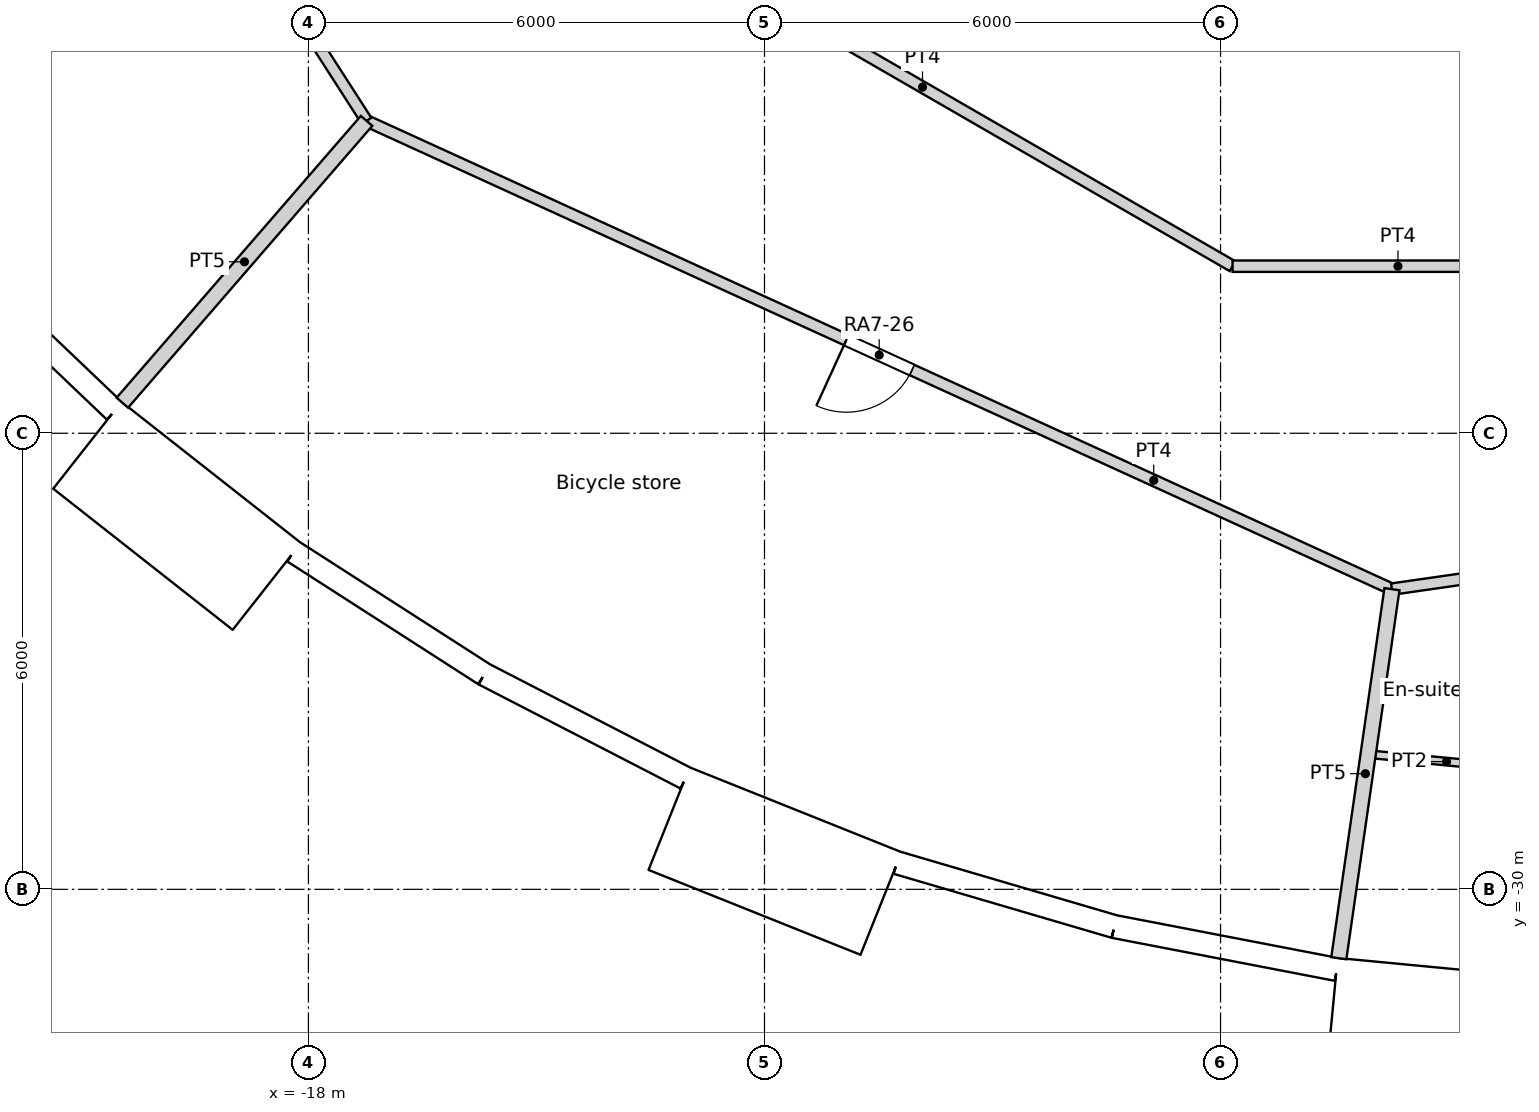
"""IFC4 building model, lengths in metres.
Left out: names, types, materials, properties, quantities, classifications, styles, units other than length and angle.
Written with IfcOpenShell. Run it as: python <this file> out.ifc"""

import sys

from ifc_helpers import new_model, si_unit, direction, frame, frame_2d, origin, origin_2d, place, context, subcontext, project, spatial, rectangle, circle, extrude, element, fill, save


model = new_model("IFC4")
c1 = context("Model", 3, precision=1e-05, world=origin(), true_north=direction((0.0, 1.0)))
c2 = subcontext(c1, "Body", "Model", "MODEL_VIEW")
j1 = project(units=[si_unit("LENGTHUNIT", "METRE"), si_unit("PLANEANGLEUNIT", "RADIAN")], contexts=[c1])
p1 = place(None, origin())
s1 = spatial("IfcSite", under=j1, at=p1, CompositionType="ELEMENT")
p2 = place(p1, origin())
s2 = spatial("IfcBuilding", under=s1, at=p2, CompositionType="ELEMENT")
p3 = place(p2, frame((0.0, 0.0, 93.0)))
s3 = spatial("IfcBuildingStorey", under=s2, at=p3, CompositionType="ELEMENT", Elevation=93.0)
for number, where, z_axis, x_axis in (
    (1, (-19.826, -22.88, 0.0), (0.0, 0.0, 1.0), (1.0, 0.0, 0.0)),
    (2, (-15.137, -26.219, 0.0), (0.0, 0.0, 1.0), (1.0, 0.0, 0.0)),
    (3, (-9.902, -28.61, 0.0), (0.0, 0.0, 1.0), (1.0, 0.0, 0.0)),
    (4, (-4.309, -29.966, 0.0), (0.0, 0.0, 1.0), (1.0, 0.0, 0.0)),
):
    element("IfcColumn", number, at=place(p3, frame(where, z_axis=z_axis, x_axis=x_axis)), inside=s3, PredefinedType="COLUMN", context=c2, shape_type="SweptSolid", body=[
        extrude(circle(Radius=0.6, at=origin_2d()), origin(), (0.0, 0.0, 1.0), 3.6),
    ])
for number, where, z_axis, x_axis in (
    (5, (-12.274, -21.259, 0.0), (0.0, 0.0, 1.0), (1.0, 0.0, 0.0)),
    (6, (-7.04, -23.516, 0.0), (0.0, 0.0, 1.0), (1.0, 0.0, 0.0)),
):
    element("IfcColumn", number, at=place(p3, frame(where, z_axis=z_axis, x_axis=x_axis)), inside=s3, PredefinedType="COLUMN", context=c2, shape_type="SweptSolid", body=[
        extrude(circle(Radius=0.65, at=origin_2d()), origin(), (0.0, 0.0, 1.0), 3.6),
    ])
p4 = place(p3, frame((-4.188, -18.35, 0.0), z_axis=(0.0, 0.0, 1.0), x_axis=(1.0, 0.0, 0.0)))
e7 = element("IfcColumn", 7, at=p4, inside=s3, PredefinedType="COLUMN", context=c2, shape_type="SweptSolid", body=[
    extrude(circle(Radius=0.7, at=origin_2d()), origin(), (0.0, 0.0, 1.0), 3.6),
])
p5 = place(p3, frame((-22.707, -21.651, 0.0), z_axis=(0.0, 0.0, 1.0), x_axis=(0.723744206617, -0.690068346896, 0.0)))
e8 = element("IfcWall", 8, at=p5, inside=s3, PredefinedType="SOLIDWALL", context=c2, shape_type="SweptSolid", body=[
    extrude(rectangle(XDim=2.98, YDim=0.3, at=frame_2d((1.49, 0.0))), origin(), (0.0, 0.0, 1.0), 3.15),
])
p6 = place(p5, frame((1.49, 0.0, 1.55)))
e9 = element("IfcOpeningElement", 9, at=p6, cuts=e8, PredefinedType="OPENING", context=c2, shape_type="SweptSolid", body=[
    extrude(circle(Radius=0.9, at=origin_2d()), frame((0.0, 0.16, 0.0), z_axis=(0.0, -1.0, 0.0), x_axis=(1.0, 0.0, 0.0)), (0.0, 0.0, 1.0), 0.32),
])
p7 = place(p3, frame((-20.907, -24.159, -0.45), z_axis=(0.0, 0.0, 1.0), x_axis=(0.786049992888, -0.618162930529, 0.0)))
e10 = element("IfcWall", 10, at=p7, inside=s3, PredefinedType="ELEMENTEDWALL", context=c2, shape_type="SweptSolid", body=[
    extrude(rectangle(XDim=3.0, YDim=1.45, at=frame_2d((1.5, 0.0))), origin(), (0.0, 0.0, 1.0), 3.6),
])
p8 = place(p7, frame((1.5, 0.0, 2.0)))
e11 = element("IfcOpeningElement", 11, at=p8, cuts=e10, PredefinedType="OPENING", context=c2, shape_type="SweptSolid", body=[
    extrude(circle(Radius=0.9, at=origin_2d()), frame((0.0, 0.735, 0.0), z_axis=(0.0, -1.0, 0.0), x_axis=(1.0, 0.0, 0.0)), (0.0, 0.0, 1.0), 1.47),
])
p9 = place(p3, frame((-18.194, -25.56, 0.0), z_axis=(0.0, 0.0, 1.0), x_axis=(0.84122372879, -0.540687190639, 0.0)))
e12 = element("IfcWall", 12, at=p9, inside=s3, PredefinedType="SOLIDWALL", context=c2, shape_type="SweptSolid", body=[
    extrude(rectangle(XDim=2.98, YDim=0.3, at=frame_2d((1.49, 0.0))), origin(), (0.0, 0.0, 1.0), 3.15),
])
p10 = place(p9, frame((1.49, 0.0, 1.55)))
e13 = element("IfcOpeningElement", 13, at=p10, cuts=e12, PredefinedType="OPENING", context=c2, shape_type="SweptSolid", body=[
    extrude(circle(Radius=0.9, at=origin_2d()), frame((0.0, 0.16, 0.0), z_axis=(0.0, -1.0, 0.0), x_axis=(1.0, 0.0, 0.0)), (0.0, 0.0, 1.0), 0.32),
])
p11 = place(p3, frame((-15.687, -27.171, 0.0), z_axis=(0.0, 0.0, 1.0), x_axis=(0.888853225096, -0.4581920386, 0.0)))
e14 = element("IfcWall", 14, at=p11, inside=s3, PredefinedType="SOLIDWALL", context=c2, shape_type="SweptSolid", body=[
    extrude(rectangle(XDim=2.979, YDim=0.3, at=frame_2d((1.49, 0.0))), origin(), (0.0, 0.0, 1.0), 3.15),
])
p12 = place(p11, frame((1.49, 0.0, 1.55)))
e15 = element("IfcOpeningElement", 15, at=p12, cuts=e14, PredefinedType="OPENING", context=c2, shape_type="SweptSolid", body=[
    extrude(circle(Radius=0.9, at=origin_2d()), frame((0.0, 0.16, 0.0), z_axis=(0.0, -1.0, 0.0), x_axis=(1.0, 0.0, 0.0)), (0.0, 0.0, 1.0), 0.32),
])
p13 = place(p3, frame((-13.254, -29.07, -0.45), z_axis=(0.0, 0.0, 1.0), x_axis=(0.928358776184, -0.371685327504, 0.0)))
e16 = element("IfcWall", 16, at=p13, inside=s3, PredefinedType="ELEMENTEDWALL", context=c2, shape_type="SweptSolid", body=[
    extrude(rectangle(XDim=3.0, YDim=1.45, at=frame_2d((1.5, 0.0))), origin(), (0.0, 0.0, 1.0), 3.6),
])
p14 = place(p13, frame((1.5, 0.0, 2.0)))
e17 = element("IfcOpeningElement", 17, at=p14, cuts=e16, PredefinedType="OPENING", context=c2, shape_type="SweptSolid", body=[
    extrude(circle(Radius=0.9, at=origin_2d()), frame((0.0, 0.735, 0.0), z_axis=(0.0, -1.0, 0.0), x_axis=(1.0, 0.0, 0.0)), (0.0, 0.0, 1.0), 1.47),
])
p15 = place(p3, frame((-10.256, -29.651, 0.0), z_axis=(0.0, 0.0, 1.0), x_axis=(0.959507586834, -0.28168278401, 0.0)))
e18 = element("IfcWall", 18, at=p15, inside=s3, PredefinedType="SOLIDWALL", context=c2, shape_type="SweptSolid", body=[
    extrude(rectangle(XDim=2.98, YDim=0.3, at=frame_2d((1.49, 0.0))), origin(), (0.0, 0.0, 1.0), 3.15),
])
p16 = place(p15, frame((1.49, 0.0, 1.55)))
e19 = element("IfcOpeningElement", 19, at=p16, cuts=e18, PredefinedType="OPENING", context=c2, shape_type="SweptSolid", body=[
    extrude(circle(Radius=0.9, at=origin_2d()), frame((0.0, 0.16, 0.0), z_axis=(0.0, -1.0, 0.0), x_axis=(1.0, 0.0, 0.0)), (0.0, 0.0, 1.0), 0.32),
])
p17 = place(p3, frame((-7.397, -30.49, 0.0), z_axis=(0.0, 0.0, 1.0), x_axis=(0.981924535406, -0.189272836848, 0.0)))
e20 = element("IfcWall", 20, at=p17, inside=s3, PredefinedType="SOLIDWALL", context=c2, shape_type="SweptSolid", body=[
    extrude(rectangle(XDim=2.98, YDim=0.3, at=frame_2d((1.49, 0.0))), origin(), (0.0, 0.0, 1.0), 3.15),
])
p18 = place(p17, frame((1.49, 0.0, 1.55)))
e21 = element("IfcOpeningElement", 21, at=p18, cuts=e20, PredefinedType="OPENING", context=c2, shape_type="SweptSolid", body=[
    extrude(circle(Radius=0.9, at=origin_2d()), frame((0.0, 0.16, 0.0), z_axis=(0.0, -1.0, 0.0), x_axis=(1.0, 0.0, 0.0)), (0.0, 0.0, 1.0), 0.32),
])
p19 = place(p3, frame((-4.527, -31.627, -0.45), z_axis=(0.0, 0.0, 1.0), x_axis=(0.995472768558, -0.09504718333, 0.0)))
e22 = element("IfcWall", 22, at=p19, inside=s3, PredefinedType="ELEMENTEDWALL", context=c2, shape_type="SweptSolid", body=[
    extrude(rectangle(XDim=3.0, YDim=1.45, at=frame_2d((1.5, 0.0))), origin(), (0.0, 0.0, 1.0), 3.6),
])
p20 = place(p19, frame((1.5, 0.0, 2.0)))
e23 = element("IfcOpeningElement", 23, at=p20, cuts=e22, PredefinedType="OPENING", context=c2, shape_type="SweptSolid", body=[
    extrude(circle(Radius=0.9, at=origin_2d()), frame((0.0, 0.735, 0.0), z_axis=(0.0, -1.0, 0.0), x_axis=(1.0, 0.0, 0.0)), (0.0, 0.0, 1.0), 1.47),
])
p21 = place(p3, frame((-25.253, -7.415, 0.0), z_axis=(0.0, 0.0, 1.0), x_axis=(0.540656073354, -0.841243728265, 0.0)))
e24 = element("IfcWall", 24, at=p21, inside=s3, PredefinedType="PARTITIONING", context=c2, shape_type="SweptSolid", body=[
    extrude(rectangle(XDim=14.829, YDim=0.15, at=frame_2d((7.415, 0.0))), origin(), (0.0, 0.0, 1.0), 3.15),
])
p22 = place(p21, frame((4.804, 0.0, 0.0)))
e25 = element("IfcOpeningElement", 25, at=p22, cuts=e24, PredefinedType="OPENING", context=c2, shape_type="SweptSolid", body=[
    extrude(rectangle(XDim=1.8, YDim=2.1, at=frame_2d((0.9, 1.05))), frame((0.0, 0.075, 0.0), z_axis=(0.0, -1.0, 0.0), x_axis=(1.0, 0.0, 0.0)), (0.0, 0.0, 1.0), 0.15),
])
p23 = place(p3, frame((-14.0, -17.092, 0.0), z_axis=(0.0, 0.0, 1.0), x_axis=(0.86602719091, -0.499996904595, 0.0)))
e26 = element("IfcWall", 26, at=p23, inside=s3, PredefinedType="PARTITIONING", context=c2, shape_type="SweptSolid", body=[
    extrude(rectangle(XDim=9.42, YDim=0.15, at=frame_2d((4.71, 0.0))), origin(), (0.0, 0.0, 1.0), 3.15),
])
p24 = place(p3, frame((-5.842, -21.802, 0.0), z_axis=(0.0, 0.0, 1.0), x_axis=(1.0, 0.0, 0.0)))
e27 = element("IfcWall", 27, at=p24, inside=s3, PredefinedType="PARTITIONING", context=c2, shape_type="SweptSolid", body=[
    extrude(rectangle(XDim=4.352, YDim=0.15, at=frame_2d((2.176, 0.0))), origin(), (0.0, 0.0, 1.0), 3.15),
])
p25 = place(p3, frame((-17.235, -19.89, 0.0), z_axis=(0.0, 0.0, 1.0), x_axis=(0.90960889055, -0.415465601743, 0.0)))
e28 = element("IfcWall", 28, at=p25, inside=s3, PredefinedType="PARTITIONING", context=c2, shape_type="SweptSolid", body=[
    extrude(rectangle(XDim=14.829, YDim=0.15, at=frame_2d((7.415, 0.0))), origin(), (0.0, 0.0, 1.0), 3.15),
])
p26 = place(p25, frame((6.939, 0.0, 0.0)))
e29 = element("IfcOpeningElement", 29, at=p26, cuts=e28, PredefinedType="OPENING", context=c2, shape_type="SweptSolid", body=[
    extrude(rectangle(XDim=0.95, YDim=2.1, at=frame_2d((0.475, 1.05))), frame((0.0, 0.075, 0.0), z_axis=(0.0, -1.0, 0.0), x_axis=(1.0, 0.0, 0.0)), (0.0, 0.0, 1.0), 0.15),
])
p27 = place(p3, frame((-3.746, -26.05, 0.0), z_axis=(0.0, 0.0, 1.0), x_axis=(0.98983491963, 0.142221066938, 0.0)))
e30 = element("IfcWall", 30, at=p27, inside=s3, PredefinedType="PARTITIONING", context=c2, shape_type="SweptSolid", body=[
    extrude(rectangle(XDim=14.83, YDim=0.15, at=frame_2d((7.415, 0.0))), origin(), (0.0, 0.0, 1.0), 3.15),
])
p28 = place(p27, frame((3.214, 0.0, 0.0)))
e31 = element("IfcOpeningElement", 31, at=p28, cuts=e30, PredefinedType="OPENING", context=c2, shape_type="SweptSolid", body=[
    extrude(rectangle(XDim=1.0, YDim=2.1, at=frame_2d((0.5, 1.05))), frame((0.0, 0.075, 0.0), z_axis=(0.0, -1.0, 0.0), x_axis=(1.0, 0.0, 0.0)), (0.0, 0.0, 1.0), 0.15),
])
p29 = place(p27, frame((5.954, 0.0, 0.0)))
e32 = element("IfcOpeningElement", 32, at=p29, cuts=e30, PredefinedType="OPENING", context=c2, shape_type="SweptSolid", body=[
    extrude(rectangle(XDim=1.0, YDim=2.1, at=frame_2d((0.5, 1.05))), frame((0.0, 0.075, 0.0), z_axis=(0.0, -1.0, 0.0), x_axis=(1.0, 0.0, 0.0)), (0.0, 0.0, 1.0), 0.15),
])
p30 = place(p27, frame((10.816, 0.0, 0.0)))
e33 = element("IfcOpeningElement", 33, at=p30, cuts=e30, PredefinedType="OPENING", context=c2, shape_type="SweptSolid", body=[
    extrude(rectangle(XDim=1.0, YDim=2.1, at=frame_2d((0.5, 1.05))), frame((0.0, 0.075, 0.0), z_axis=(0.0, -1.0, 0.0), x_axis=(1.0, 0.0, 0.0)), (0.0, 0.0, 1.0), 0.15),
])
p31 = place(p3, frame((-20.448, -23.598, 0.0), z_axis=(0.0, 0.0, 1.0), x_axis=(0.654847179409, 0.755761319214, 0.0)))
e34 = element("IfcWall", 34, at=p31, inside=s3, PredefinedType="PARTITIONING", context=c2, shape_type="SweptSolid", body=[
    extrude(rectangle(XDim=4.906, YDim=0.2, at=frame_2d((2.453, 0.0))), origin(), (0.0, 0.0, 1.0), 3.15),
])
p32 = place(p3, frame((-4.444, -30.906, 0.0), z_axis=(0.0, 0.0, 1.0), x_axis=(0.142452592463, 0.989801626035, 0.0)))
e35 = element("IfcWall", 35, at=p32, inside=s3, PredefinedType="PARTITIONING", context=c2, shape_type="SweptSolid", body=[
    extrude(rectangle(XDim=4.905, YDim=0.2, at=frame_2d((2.453, 0.0))), origin(), (0.0, 0.0, 1.0), 3.15),
])
p33 = place(p3, frame((-4.058, -28.221, 0.0), z_axis=(0.0, 0.0, 1.0), x_axis=(0.995466291052, -0.095115000814, 0.0)))
e36 = element("IfcWall", 36, at=p33, inside=s3, PredefinedType="PARTITIONING", context=c2, shape_type="SweptSolid", body=[
    extrude(rectangle(XDim=2.071, YDim=0.1, at=frame_2d((1.036, 0.0))), origin(), (0.0, 0.0, 1.0), 3.15),
])
p34 = place(p6, origin())
e37 = element("IfcWindow", 37, at=p34, inside=s3, PartitioningType="SINGLE_PANEL", PredefinedType="WINDOW", context=c2, shape_type="SweptSolid", body=[
    extrude(circle(Radius=0.9, at=origin_2d()), frame((0.0, 0.12, 0.0), z_axis=(0.0, -1.0, 0.0), x_axis=(1.0, 0.0, 0.0)), (0.0, 0.0, 1.0), 0.1),
])
fill(e9, e37)
p35 = place(p8, origin())
e38 = element("IfcWindow", 38, at=p35, inside=s3, PartitioningType="SINGLE_PANEL", PredefinedType="WINDOW", context=c2, shape_type="SweptSolid", body=[
    extrude(circle(Radius=0.9, at=origin_2d()), frame((0.0, 0.695, 0.0), z_axis=(0.0, -1.0, 0.0), x_axis=(1.0, 0.0, 0.0)), (0.0, 0.0, 1.0), 0.1),
])
fill(e11, e38)
p36 = place(p10, origin())
e39 = element("IfcWindow", 39, at=p36, inside=s3, PartitioningType="SINGLE_PANEL", PredefinedType="WINDOW", context=c2, shape_type="SweptSolid", body=[
    extrude(circle(Radius=0.9, at=origin_2d()), frame((0.0, 0.12, 0.0), z_axis=(0.0, -1.0, 0.0), x_axis=(1.0, 0.0, 0.0)), (0.0, 0.0, 1.0), 0.1),
])
fill(e13, e39)
p37 = place(p12, origin())
e40 = element("IfcWindow", 40, at=p37, inside=s3, PartitioningType="SINGLE_PANEL", PredefinedType="WINDOW", context=c2, shape_type="SweptSolid", body=[
    extrude(circle(Radius=0.9, at=origin_2d()), frame((0.0, 0.12, 0.0), z_axis=(0.0, -1.0, 0.0), x_axis=(1.0, 0.0, 0.0)), (0.0, 0.0, 1.0), 0.1),
])
fill(e15, e40)
p38 = place(p14, origin())
e41 = element("IfcWindow", 41, at=p38, inside=s3, PartitioningType="SINGLE_PANEL", PredefinedType="WINDOW", context=c2, shape_type="SweptSolid", body=[
    extrude(circle(Radius=0.9, at=origin_2d()), frame((0.0, 0.695, 0.0), z_axis=(0.0, -1.0, 0.0), x_axis=(1.0, 0.0, 0.0)), (0.0, 0.0, 1.0), 0.1),
])
fill(e17, e41)
p39 = place(p16, origin())
e42 = element("IfcWindow", 42, at=p39, inside=s3, PartitioningType="SINGLE_PANEL", PredefinedType="WINDOW", context=c2, shape_type="SweptSolid", body=[
    extrude(circle(Radius=0.9, at=origin_2d()), frame((0.0, 0.12, 0.0), z_axis=(0.0, -1.0, 0.0), x_axis=(1.0, 0.0, 0.0)), (0.0, 0.0, 1.0), 0.1),
])
fill(e19, e42)
p40 = place(p18, origin())
e43 = element("IfcWindow", 43, at=p40, inside=s3, PartitioningType="SINGLE_PANEL", PredefinedType="WINDOW", context=c2, shape_type="SweptSolid", body=[
    extrude(circle(Radius=0.9, at=origin_2d()), frame((0.0, 0.12, 0.0), z_axis=(0.0, -1.0, 0.0), x_axis=(1.0, 0.0, 0.0)), (0.0, 0.0, 1.0), 0.1),
])
fill(e21, e43)
p41 = place(p20, origin())
e44 = element("IfcWindow", 44, at=p41, inside=s3, PartitioningType="SINGLE_PANEL", PredefinedType="WINDOW", context=c2, shape_type="SweptSolid", body=[
    extrude(circle(Radius=0.9, at=origin_2d()), frame((0.0, 0.695, 0.0), z_axis=(0.0, -1.0, 0.0), x_axis=(1.0, 0.0, 0.0)), (0.0, 0.0, 1.0), 0.1),
])
fill(e23, e44)
p42 = place(p26, origin())
e45 = element("IfcDoor", 45, at=p42, inside=s3, OperationType="SINGLE_SWING_RIGHT", PredefinedType="DOOR", context=c2, shape_type="SweptSolid", body=[
    extrude(rectangle(XDim=0.95, YDim=2.1, at=frame_2d((0.475, 1.05))), frame((0.0, 0.025, 0.0), z_axis=(0.0, -1.0, 0.0), x_axis=(1.0, 0.0, 0.0)), (0.0, 0.0, 1.0), 0.05),
])
fill(e29, e45)
save(model, sys.argv[1])
